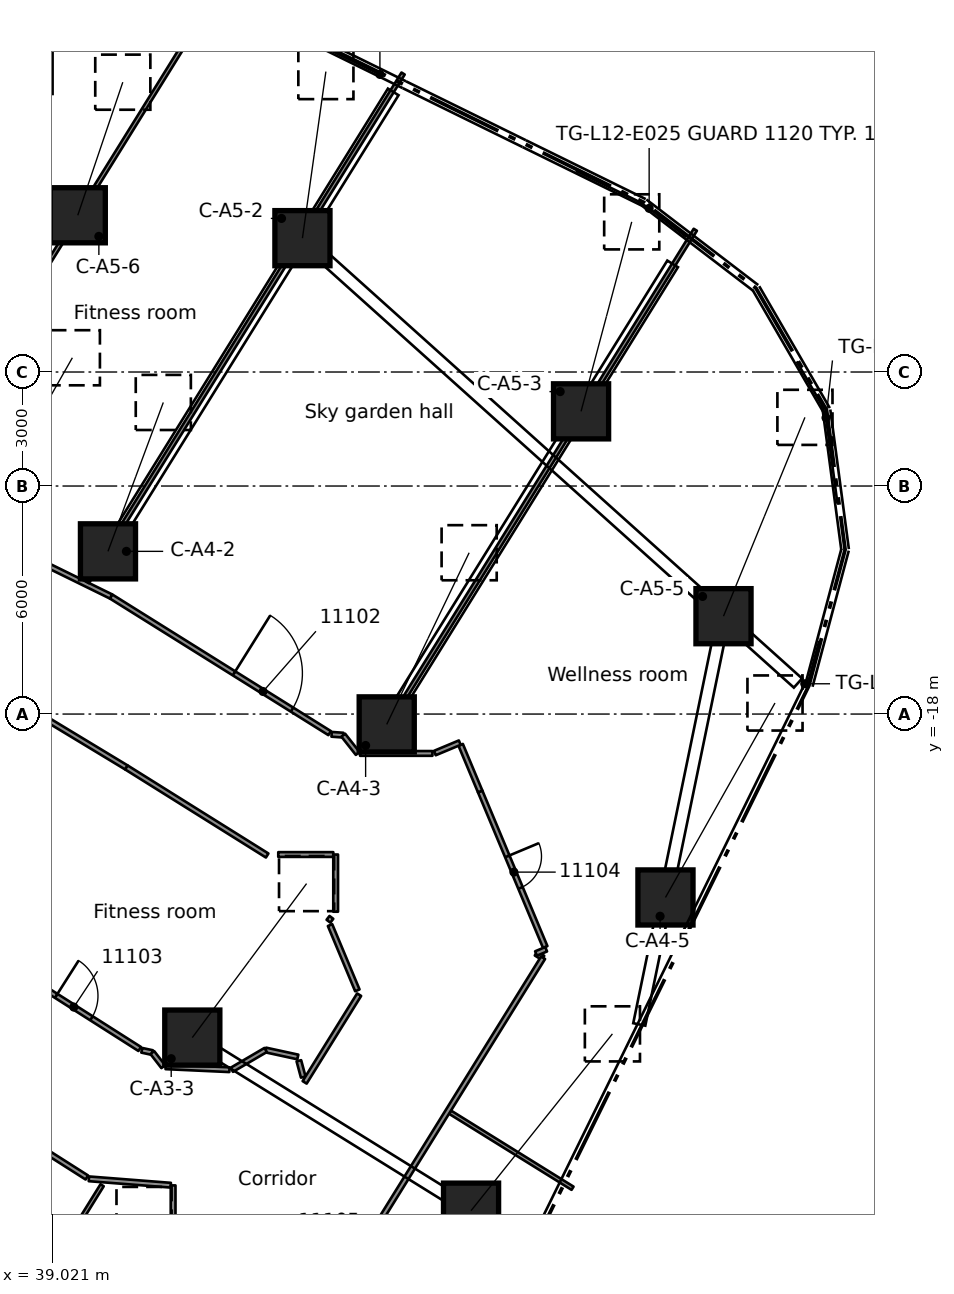
"""IFC4 building model, lengths in metres.
Left out: names, types, materials, properties, quantities, classifications, styles, units other than length and angle.
Written with IfcOpenShell. Run it as: python <this file> out.ifc"""

import sys

from ifc_helpers import new_model, si_unit, direction, frame, frame_2d, origin, origin_2d, place, context, subcontext, project, spatial, rectangle, extrude, element, fill, save


model = new_model("IFC4")
c1 = context("Model", 3, precision=1e-05, world=origin(), true_north=direction((0.0, 1.0)))
c2 = subcontext(c1, "Body", "Model", "MODEL_VIEW")
j1 = project(units=[si_unit("LENGTHUNIT", "METRE"), si_unit("PLANEANGLEUNIT", "RADIAN")], contexts=[c1])
p1 = place(None, origin())
s1 = spatial("IfcSite", under=j1, at=p1, CompositionType="ELEMENT")
p2 = place(p1, origin())
s2 = spatial("IfcBuilding", under=s1, at=p2, CompositionType="ELEMENT")
p3 = place(p2, frame((0.0, 0.0, 54.8)))
s3 = spatial("IfcBuildingStorey", under=s2, at=p3, CompositionType="ELEMENT", Elevation=54.8)
p4 = place(p3, frame((37.59, -34.754, 0.644), z_axis=(0.650011603321, 0.606231859074, 0.45822248809), x_axis=(-0.682050250906, 0.731305309183, 0.0)))
e1 = element("IfcColumn", 1, at=p4, inside=s3, PredefinedType="COLUMN", context=c2, shape_type="SweptSolid", body=[
    extrude(rectangle(XDim=1.45, YDim=1.45, at=origin_2d()), origin(), (0.0, 0.0, 1.0), 5.917),
])
p5 = place(p3, frame((42.706, -26.513, 0.638), z_axis=(0.52437230605, 0.706642348451, 0.475068706635), x_axis=(-0.803049477983, 0.595912355898, 0.0)))
e2 = element("IfcColumn", 2, at=p5, inside=s3, PredefinedType="COLUMN", context=c2, shape_type="SweptSolid", body=[
    extrude(rectangle(XDim=1.45, YDim=1.45, at=origin_2d()), origin(), (0.0, 0.0, 1.0), 5.734),
])
p6 = place(p3, frame((50.041, -31.067, 0.661), z_axis=(0.569633877133, 0.712332079471, 0.410000310463), x_axis=(-0.780992758951, 0.624540079151, 0.0)))
e3 = element("IfcColumn", 3, at=p6, inside=s3, PredefinedType="COLUMN", context=c2, shape_type="SweptSolid", body=[
    extrude(rectangle(XDim=1.45, YDim=1.45, at=origin_2d()), origin(), (0.0, 0.0, 1.0), 6.531),
])
p7 = place(p3, frame((40.487, -13.719, 0.603), z_axis=(0.289589157481, 0.779229845617, 0.55582278432), x_axis=(-0.937362069968, 0.348356641656, 0.0)))
e4 = element("IfcColumn", 4, at=p7, inside=s3, PredefinedType="COLUMN", context=c2, shape_type="SweptSolid", body=[
    extrude(rectangle(XDim=1.45, YDim=1.45, at=origin_2d()), origin(), (0.0, 0.0, 1.0), 5.028),
])
p8 = place(p3, frame((47.822, -18.272, 0.637), z_axis=(0.380217041429, 0.791847782589, 0.47792477506), x_axis=(-0.901465266599, 0.432851444626, 0.0)))
e5 = element("IfcColumn", 5, at=p8, inside=s3, PredefinedType="COLUMN", context=c2, shape_type="SweptSolid", body=[
    extrude(rectangle(XDim=1.45, YDim=1.45, at=origin_2d()), origin(), (0.0, 0.0, 1.0), 5.705),
])
p9 = place(p3, frame((55.157, -22.826, 0.659), z_axis=(0.446435836875, 0.792617425249, 0.415274199469), x_axis=(-0.87129895366, 0.490752619302, 0.0)))
e6 = element("IfcColumn", 6, at=p9, inside=s3, PredefinedType="COLUMN", context=c2, shape_type="SweptSolid", body=[
    extrude(rectangle(XDim=1.45, YDim=1.45, at=origin_2d()), origin(), (0.0, 0.0, 1.0), 6.456),
])
p10 = place(p3, frame((37.655, -11.96, 0.583), z_axis=(0.397363899907, 0.699303127123, 0.594202884079), x_axis=(-0.86943915975, 0.494040026206, 0.0)))
e7 = element("IfcColumn", 7, at=p10, inside=s3, PredefinedType="COLUMN", context=c2, shape_type="SweptSolid", body=[
    extrude(rectangle(XDim=1.45, YDim=1.45, at=origin_2d()), origin(), (0.0, 0.0, 1.0), 4.769),
])
p11 = place(p3, frame((45.604, -5.478, 0.615), z_axis=(0.118141081309, 0.839329969429, 0.530629708295), x_axis=(-0.990238625022, 0.139382443348, 0.0)))
e8 = element("IfcColumn", 8, at=p11, inside=s3, PredefinedType="COLUMN", context=c2, shape_type="SweptSolid", body=[
    extrude(rectangle(XDim=1.45, YDim=1.45, at=origin_2d()), origin(), (0.0, 0.0, 1.0), 5.222),
])
p12 = place(p3, frame((52.936, -10.035, 0.641), z_axis=(0.228549066169, 0.854840481556, 0.465846622233), x_axis=(-0.966068286235, 0.258286790855, 0.0)))
e9 = element("IfcColumn", 9, at=p12, inside=s3, PredefinedType="COLUMN", context=c2, shape_type="SweptSolid", body=[
    extrude(rectangle(XDim=1.45, YDim=1.45, at=origin_2d()), origin(), (0.0, 0.0, 1.0), 5.833),
])
p13 = place(p3, frame((56.684, -15.425, 0.655), z_axis=(0.342224171431, 0.835577531477, 0.42975900849), x_axis=(-0.925392799658, 0.379009454158, 0.0)))
e10 = element("IfcColumn", 10, at=p13, inside=s3, PredefinedType="COLUMN", context=c2, shape_type="SweptSolid", body=[
    extrude(rectangle(XDim=1.45, YDim=1.45, at=origin_2d()), origin(), (0.0, 0.0, 1.0), 6.261),
])
p14 = place(p3, frame((39.692, -4.876, 0.574), z_axis=(0.253806770761, 0.75002149151, 0.610778098322), x_axis=(-0.947233862159, 0.320543305, 0.0)))
e11 = element("IfcColumn", 11, at=p14, inside=s3, PredefinedType="COLUMN", context=c2, shape_type="SweptSolid", body=[
    extrude(rectangle(XDim=1.45, YDim=1.45, at=origin_2d()), origin(), (0.0, 0.0, 1.0), 4.669),
])
p15 = place(p3, frame((45.51, -27.123, 0.0), z_axis=(0.0, 0.0, 1.0), x_axis=(0.259479518398, -0.96574861094, 0.0)))
e12 = element("IfcWall", 12, at=p15, inside=s3, PredefinedType="PARTITIONING", context=c2, shape_type="SweptSolid", body=[
    extrude(rectangle(XDim=0.443, YDim=0.125, at=frame_2d((0.222, 0.0))), origin(), (0.0, 0.0, 1.0), 3.58),
])
p16 = place(p3, frame((46.331, -23.553, 0.0), z_axis=(0.0, 0.0, 1.0), x_axis=(0.385798010162, -0.922583272857, 0.0)))
e13 = element("IfcWall", 13, at=p16, inside=s3, PredefinedType="PARTITIONING", context=c2, shape_type="SweptSolid", body=[
    extrude(rectangle(XDim=1.861, YDim=0.125, at=frame_2d((0.931, 0.0))), origin(), (0.0, 0.0, 1.0), 3.58),
])
p17 = place(p3, frame((50.281, -20.037, 0.0), z_axis=(0.0, 0.0, 1.0), x_axis=(0.385881073625, -0.922548533692, 0.0)))
e14 = element("IfcWall", 14, at=p17, inside=s3, PredefinedType="PARTITIONING", context=c2, shape_type="SweptSolid", body=[
    extrude(rectangle(XDim=4.436, YDim=0.125, at=frame_2d((2.218, 0.0))), origin(), (0.0, 0.0, 1.0), 3.58),
])
p18 = place(p17, frame((1.85, 0.0, 0.0)))
e15 = element("IfcOpeningElement", 15, at=p18, cuts=e14, PredefinedType="OPENING", context=c2, shape_type="SweptSolid", body=[
    extrude(rectangle(XDim=0.9, YDim=2.1, at=frame_2d((0.45, 1.05))), frame((0.0, 0.073, 0.0), z_axis=(0.0, -1.0, 0.0), x_axis=(1.0, 0.0, 0.0)), (0.0, 0.0, 1.0), 0.145),
])
p19 = place(p3, frame((49.768, -18.81, 0.0), z_axis=(0.0, 0.0, 1.0), x_axis=(0.385683969808, -0.922630953, 0.0)))
e16 = element("IfcWall", 16, at=p19, inside=s3, PredefinedType="PARTITIONING", context=c2, shape_type="SweptSolid", body=[
    extrude(rectangle(XDim=1.33, YDim=0.125, at=frame_2d((0.665, 0.0))), origin(), (0.0, 0.0, 1.0), 3.58),
])
p20 = place(p3, frame((39.932, -30.195, 0.0), z_axis=(0.0, 0.0, 1.0), x_axis=(-0.843820070804, 0.536626208927, 0.0)))
e17 = element("IfcWall", 17, at=p20, inside=s3, PredefinedType="PARTITIONING", context=c2, shape_type="SweptSolid", body=[
    extrude(rectangle(XDim=6.464, YDim=0.125, at=frame_2d((3.232, 0.0))), origin(), (0.0, 0.0, 1.0), 3.58),
])
p21 = place(p20, frame((1.538, 0.0, 0.0)))
e18 = element("IfcOpeningElement", 18, at=p21, cuts=e17, PredefinedType="OPENING", context=c2, shape_type="SweptSolid", body=[
    extrude(rectangle(XDim=1.8, YDim=2.1, at=frame_2d((0.9, 1.05))), frame((0.0, 0.073, 0.0), z_axis=(0.0, -1.0, 0.0), x_axis=(1.0, 0.0, 0.0)), (0.0, 0.0, 1.0), 0.145),
])
p22 = place(p3, frame((37.774, -24.556, 0.0), z_axis=(0.0, 0.0, 1.0), x_axis=(0.843747538383, -0.53674024581, 0.0)))
e19 = element("IfcWall", 19, at=p22, inside=s3, PredefinedType="PARTITIONING", context=c2, shape_type="SweptSolid", body=[
    extrude(rectangle(XDim=4.205, YDim=0.125, at=frame_2d((2.103, 0.0))), origin(), (0.0, 0.0, 1.0), 3.58),
])
p23 = place(p22, frame((1.6, 0.0, 0.0)))
e20 = element("IfcOpeningElement", 20, at=p23, cuts=e19, PredefinedType="OPENING", context=c2, shape_type="SweptSolid", body=[
    extrude(rectangle(XDim=1.1, YDim=2.1, at=frame_2d((0.55, 1.05))), frame((0.0, 0.073, 0.0), z_axis=(0.0, -1.0, 0.0), x_axis=(1.0, 0.0, 0.0)), (0.0, 0.0, 1.0), 0.145),
])
p24 = place(p3, frame((40.972, -19.405, 0.0), z_axis=(0.0, 0.0, 1.0), x_axis=(-0.8557851023, 0.517331478534, 0.0)))
e21 = element("IfcWall", 21, at=p24, inside=s3, PredefinedType="PARTITIONING", context=c2, shape_type="SweptSolid", body=[
    extrude(rectangle(XDim=2.745, YDim=0.125, at=frame_2d((1.372, 0.0))), origin(), (0.0, 0.0, 1.0), 3.58),
])
p25 = place(p3, frame((40.972, -19.405, 0.0), z_axis=(0.0, 0.0, 1.0), x_axis=(0.847809891227, -0.530300281291, 0.0)))
e22 = element("IfcWall", 22, at=p25, inside=s3, PredefinedType="PARTITIONING", context=c2, shape_type="SweptSolid", body=[
    extrude(rectangle(XDim=4.369, YDim=0.125, at=frame_2d((2.185, 0.0))), origin(), (0.0, 0.0, 1.0), 3.58),
])
p26 = place(p3, frame((40.567, -14.906, 0.0), z_axis=(0.0, 0.0, 1.0), x_axis=(0.847984152338, -0.530021581998, 0.0)))
e23 = element("IfcWall", 23, at=p26, inside=s3, PredefinedType="PARTITIONING", context=c2, shape_type="SweptSolid", body=[
    extrude(rectangle(XDim=6.784, YDim=0.125, at=frame_2d((3.392, 0.0))), origin(), (0.0, 0.0, 1.0), 3.58),
])
p27 = place(p26, frame((3.817, 0.0, 0.0)))
e24 = element("IfcOpeningElement", 24, at=p27, cuts=e23, PredefinedType="OPENING", context=c2, shape_type="SweptSolid", body=[
    extrude(rectangle(XDim=1.8, YDim=2.1, at=frame_2d((0.9, 1.05))), frame((0.0, 0.073, 0.0), z_axis=(0.0, -1.0, 0.0), x_axis=(1.0, 0.0, 0.0)), (0.0, 0.0, 1.0), 0.145),
])
p28 = place(p3, frame((51.751, -24.3, 0.0), z_axis=(0.0, 0.0, 1.0), x_axis=(0.84888732671, -0.528573842098, 0.0)))
e25 = element("IfcWall", 25, at=p28, inside=s3, PredefinedType="PARTITIONING", context=c2, shape_type="SweptSolid", body=[
    extrude(rectangle(XDim=0.216, YDim=0.125, at=frame_2d((0.108, 0.0))), origin(), (0.0, 0.0, 1.0), 3.58),
])
p29 = place(p3, frame((49.487, -28.475, 0.0), z_axis=(0.0, 0.0, 1.0), x_axis=(0.849602400196, -0.527423702143, 0.0)))
e26 = element("IfcWall", 26, at=p29, inside=s3, PredefinedType="PARTITIONING", context=c2, shape_type="SweptSolid", body=[
    extrude(rectangle(XDim=3.796, YDim=0.1, at=frame_2d((1.898, 0.0))), origin(), (0.0, 0.0, 1.0), 3.58),
])
p30 = place(p3, frame((37.771, -13.534, 0.0), z_axis=(0.0, 0.0, 1.0), x_axis=(0.897726238761, -0.440553742738, 0.0)))
e27 = element("IfcWall", 27, at=p30, inside=s3, PredefinedType="PARTITIONING", context=c2, shape_type="SweptSolid", body=[
    extrude(rectangle(XDim=3.115, YDim=0.125, at=frame_2d((1.557, 0.0))), origin(), (0.0, 0.0, 1.0), 3.58),
])
p31 = place(p3, frame((39.985, -30.229, 0.0), z_axis=(0.0, 0.0, 1.0), x_axis=(0.996972826888, -0.077750771356, 0.0)))
e28 = element("IfcWall", 28, at=p31, inside=s3, PredefinedType="PARTITIONING", context=c2, shape_type="SweptSolid", body=[
    extrude(rectangle(XDim=2.16, YDim=0.125, at=frame_2d((1.08, 0.0))), origin(), (0.0, 0.0, 1.0), 3.58),
])
p32 = place(p3, frame((44.636, -26.839, 0.0), z_axis=(0.0, 0.0, 1.0), x_axis=(0.977242421198, -0.212125552944, 0.0)))
e29 = element("IfcWall", 29, at=p32, inside=s3, PredefinedType="PARTITIONING", context=c2, shape_type="SweptSolid", body=[
    extrude(rectangle(XDim=0.867, YDim=0.125, at=frame_2d((0.433, 0.0))), origin(), (0.0, 0.0, 1.0), 3.58),
])
p33 = place(p3, frame((43.683, -27.358, 0.0), z_axis=(0.0, 0.0, 1.0), x_axis=(-0.998952909466, 0.045750242292, 0.0)))
e30 = element("IfcWall", 30, at=p33, inside=s3, PredefinedType="PARTITIONING", context=c2, shape_type="SweptSolid", body=[
    extrude(rectangle(XDim=1.681, YDim=0.125, at=frame_2d((0.84, 0.0))), origin(), (0.0, 0.0, 1.0), 3.58),
])
p34 = place(p3, frame((41.377, -26.847, 0.0), z_axis=(0.0, 0.0, 1.0), x_axis=(0.977308287744, -0.211821884392, 0.0)))
e31 = element("IfcWall", 31, at=p34, inside=s3, PredefinedType="PARTITIONING", context=c2, shape_type="SweptSolid", body=[
    extrude(rectangle(XDim=0.283, YDim=0.125, at=frame_2d((0.142, 0.0))), origin(), (0.0, 0.0, 1.0), 3.58),
])
p35 = place(p3, frame((46.372, -18.533, 0.0), z_axis=(0.0, 0.0, 1.0), x_axis=(0.99743033576, -0.071643040877, 0.0)))
e32 = element("IfcWall", 32, at=p35, inside=s3, PredefinedType="PARTITIONING", context=c2, shape_type="SweptSolid", body=[
    extrude(rectangle(XDim=0.307, YDim=0.125, at=frame_2d((0.153, 0.0))), origin(), (0.0, 0.0, 1.0), 3.58),
])
p36 = place(p3, frame((44.968, -21.696, 0.0), z_axis=(0.0, 0.0, 1.0), x_axis=(1.0, 0.0, 0.0)))
e33 = element("IfcWall", 33, at=p36, inside=s3, PredefinedType="PARTITIONING", context=c2, shape_type="SweptSolid", body=[
    extrude(rectangle(XDim=1.448, YDim=0.125, at=frame_2d((0.724, 0.0))), origin(), (0.0, 0.0, 1.0), 3.58),
])
p37 = place(p3, frame((47.12, -19.036, 0.0), z_axis=(0.0, 0.0, 1.0), x_axis=(1.0, 0.0, 0.0)))
e34 = element("IfcWall", 34, at=p37, inside=s3, PredefinedType="PARTITIONING", context=c2, shape_type="SweptSolid", body=[
    extrude(rectangle(XDim=1.905, YDim=0.125, at=frame_2d((0.952, 0.0))), origin(), (0.0, 0.0, 1.0), 3.58),
])
p38 = place(p3, frame((51.751, -24.3, 0.0), z_axis=(0.0, 0.0, 1.0), x_axis=(0.922826245199, 0.385216460152, 0.0)))
e35 = element("IfcWall", 35, at=p38, inside=s3, PredefinedType="PARTITIONING", context=c2, shape_type="SweptSolid", body=[
    extrude(rectangle(XDim=0.288, YDim=0.125, at=frame_2d((0.144, 0.0))), origin(), (0.0, 0.0, 1.0), 3.58),
])
p39 = place(p3, frame((49.087, -19.027, 0.0), z_axis=(0.0, 0.0, 1.0), x_axis=(0.922375671866, 0.386294084798, 0.0)))
e36 = element("IfcWall", 36, at=p39, inside=s3, PredefinedType="PARTITIONING", context=c2, shape_type="SweptSolid", body=[
    extrude(rectangle(XDim=0.712, YDim=0.125, at=frame_2d((0.356, 0.0))), origin(), (0.0, 0.0, 1.0), 3.58),
])
p40 = place(p3, frame((46.289, -23.451, 0.0), z_axis=(0.0, 0.0, 1.0), x_axis=(0.606449175924, 0.795122252878, 0.0)))
e37 = element("IfcWall", 37, at=p40, inside=s3, PredefinedType="PARTITIONING", context=c2, shape_type="SweptSolid", body=[
    extrude(rectangle(XDim=0.127, YDim=0.125, at=frame_2d((0.063, 0.0))), origin(), (0.0, 0.0, 1.0), 3.58),
])
p41 = place(p3, frame((45.662, -27.691, 0.0), z_axis=(0.0, 0.0, 1.0), x_axis=(0.527888562737, 0.849313643674, 0.0)))
e38 = element("IfcWall", 38, at=p41, inside=s3, PredefinedType="PARTITIONING", context=c2, shape_type="SweptSolid", body=[
    extrude(rectangle(XDim=2.716, YDim=0.125, at=frame_2d((1.358, 0.0))), origin(), (0.0, 0.0, 1.0), 3.58),
])
p42 = place(p3, frame((46.935, -32.468, 0.0), z_axis=(0.0, 0.0, 1.0), x_axis=(0.527420544761, 0.849604360255, 0.0)))
e39 = element("IfcWall", 39, at=p42, inside=s3, PredefinedType="PARTITIONING", context=c2, shape_type="SweptSolid", body=[
    extrude(rectangle(XDim=9.482, YDim=0.125, at=frame_2d((4.741, 0.0))), origin(), (0.0, 0.0, 1.0), 3.58),
])
p43 = place(p3, frame((32.082, -43.688, 0.0), z_axis=(0.0, 0.0, 1.0), x_axis=(0.527454544874, 0.849583252596, 0.0)))
e40 = element("IfcWall", 40, at=p43, inside=s3, PredefinedType="PARTITIONING", context=c2, shape_type="SweptSolid", body=[
    extrude(rectangle(XDim=15.643, YDim=0.1, at=frame_2d((7.822, 0.0))), origin(), (0.0, 0.0, 1.0), 3.58),
])
p44 = place(p3, frame((47.442, -18.947, 0.0), z_axis=(0.0, 0.0, 1.0), x_axis=(0.527488067466, 0.849562439542, 0.0)))
e41 = element("IfcWall", 41, at=p44, inside=s3, PredefinedType="PARTITIONING", context=c2, shape_type="SweptSolid", body=[
    extrude(rectangle(XDim=16.114, YDim=0.1, at=frame_2d((8.057, 0.0))), origin(), (0.0, 0.0, 1.0), 3.58),
])
p45 = place(p3, frame((39.944, -14.531, 0.0), z_axis=(0.0, 0.0, 1.0), x_axis=(0.527404137303, 0.849614545518, 0.0)))
e42 = element("IfcWall", 42, at=p45, inside=s3, PredefinedType="PARTITIONING", context=c2, shape_type="SweptSolid", body=[
    extrude(rectangle(XDim=15.754, YDim=0.1, at=frame_2d((7.877, 0.0))), origin(), (0.0, 0.0, 1.0), 3.58),
])
p46 = place(p3, frame((34.397, -13.416, 0.0), z_axis=(0.0, 0.0, 1.0), x_axis=(0.527477648144, 0.849568908746, 0.0)))
e43 = element("IfcWall", 43, at=p46, inside=s3, PredefinedType="PARTITIONING", context=c2, shape_type="SweptSolid", body=[
    extrude(rectangle(XDim=17.206, YDim=0.1, at=frame_2d((8.603, 0.0))), origin(), (0.0, 0.0, 1.0), 3.58),
])
p47 = place(p3, frame((43.745, -27.361, 0.0), z_axis=(0.0, 0.0, 1.0), x_axis=(0.86280822345, 0.505531373455, 0.0)))
e44 = element("IfcWall", 44, at=p47, inside=s3, PredefinedType="PARTITIONING", context=c2, shape_type="SweptSolid", body=[
    extrude(rectangle(XDim=1.032, YDim=0.125, at=frame_2d((0.516, 0.0))), origin(), (0.0, 0.0, 1.0), 3.58),
])
p48 = place(p3, frame((47.058, -19.036, 0.0), z_axis=(0.0, 0.0, 1.0), x_axis=(-0.620070307774, 0.784546246831, 0.0)))
e45 = element("IfcWall", 45, at=p48, inside=s3, PredefinedType="PARTITIONING", context=c2, shape_type="SweptSolid", body=[
    extrude(rectangle(XDim=0.613, YDim=0.125, at=frame_2d((0.307, 0.0))), origin(), (0.0, 0.0, 1.0), 3.58),
])
p49 = place(p3, frame((46.478, -23.201, 0.0), z_axis=(0.0, 0.0, 1.0), x_axis=(0.0, 1.0, 0.0)))
e46 = element("IfcWall", 46, at=p49, inside=s3, PredefinedType="PARTITIONING", context=c2, shape_type="SweptSolid", body=[
    extrude(rectangle(XDim=1.505, YDim=0.125, at=frame_2d((0.752, 0.0))), origin(), (0.0, 0.0, 1.0), 3.58),
])
p50 = place(p3, frame((42.201, -31.909, 0.0), z_axis=(0.0, 0.0, 1.0), x_axis=(0.0, 1.0, 0.0)))
e47 = element("IfcWall", 47, at=p50, inside=s3, PredefinedType="PARTITIONING", context=c2, shape_type="SweptSolid", body=[
    extrude(rectangle(XDim=1.507, YDim=0.125, at=frame_2d((0.753, 0.0))), origin(), (0.0, 0.0, 1.0), 3.58),
])
p51 = place(p3, frame((41.942, -27.278, 0.0), z_axis=(0.0, 0.0, 1.0), x_axis=(-0.612896389525, 0.790163284206, 0.0)))
e48 = element("IfcWall", 48, at=p51, inside=s3, PredefinedType="PARTITIONING", context=c2, shape_type="SweptSolid", body=[
    extrude(rectangle(XDim=0.47, YDim=0.125, at=frame_2d((0.235, 0.0))), origin(), (0.0, 0.0, 1.0), 3.58),
])
p52 = place(p27, origin())
e49 = element("IfcDoor", 49, at=p52, inside=s3, OperationType="DOUBLE_DOOR_SINGLE_SWING", PredefinedType="DOOR", context=c2, shape_type="SweptSolid", body=[
    extrude(rectangle(XDim=1.8, YDim=2.1, at=frame_2d((0.9, 1.05))), frame((0.0, 0.025, 0.0), z_axis=(0.0, -1.0, 0.0), x_axis=(1.0, 0.0, 0.0)), (0.0, 0.0, 1.0), 0.05),
])
fill(e24, e49)
p53 = place(p23, origin())
e50 = element("IfcDoor", 50, at=p53, inside=s3, OperationType="SINGLE_SWING_RIGHT", PredefinedType="DOOR", context=c2, shape_type="SweptSolid", body=[
    extrude(rectangle(XDim=1.1, YDim=2.1, at=frame_2d((0.55, 1.05))), frame((0.0, 0.025, 0.0), z_axis=(0.0, -1.0, 0.0), x_axis=(1.0, 0.0, 0.0)), (0.0, 0.0, 1.0), 0.05),
])
fill(e20, e50)
p54 = place(p18, origin())
e51 = element("IfcDoor", 51, at=p54, inside=s3, OperationType="SINGLE_SWING_RIGHT", PredefinedType="DOOR", context=c2, shape_type="SweptSolid", body=[
    extrude(rectangle(XDim=0.9, YDim=2.1, at=frame_2d((0.45, 1.05))), frame((0.0, 0.025, 0.0), z_axis=(0.0, -1.0, 0.0), x_axis=(1.0, 0.0, 0.0)), (0.0, 0.0, 1.0), 0.05),
])
fill(e15, e51)
save(model, sys.argv[1])
